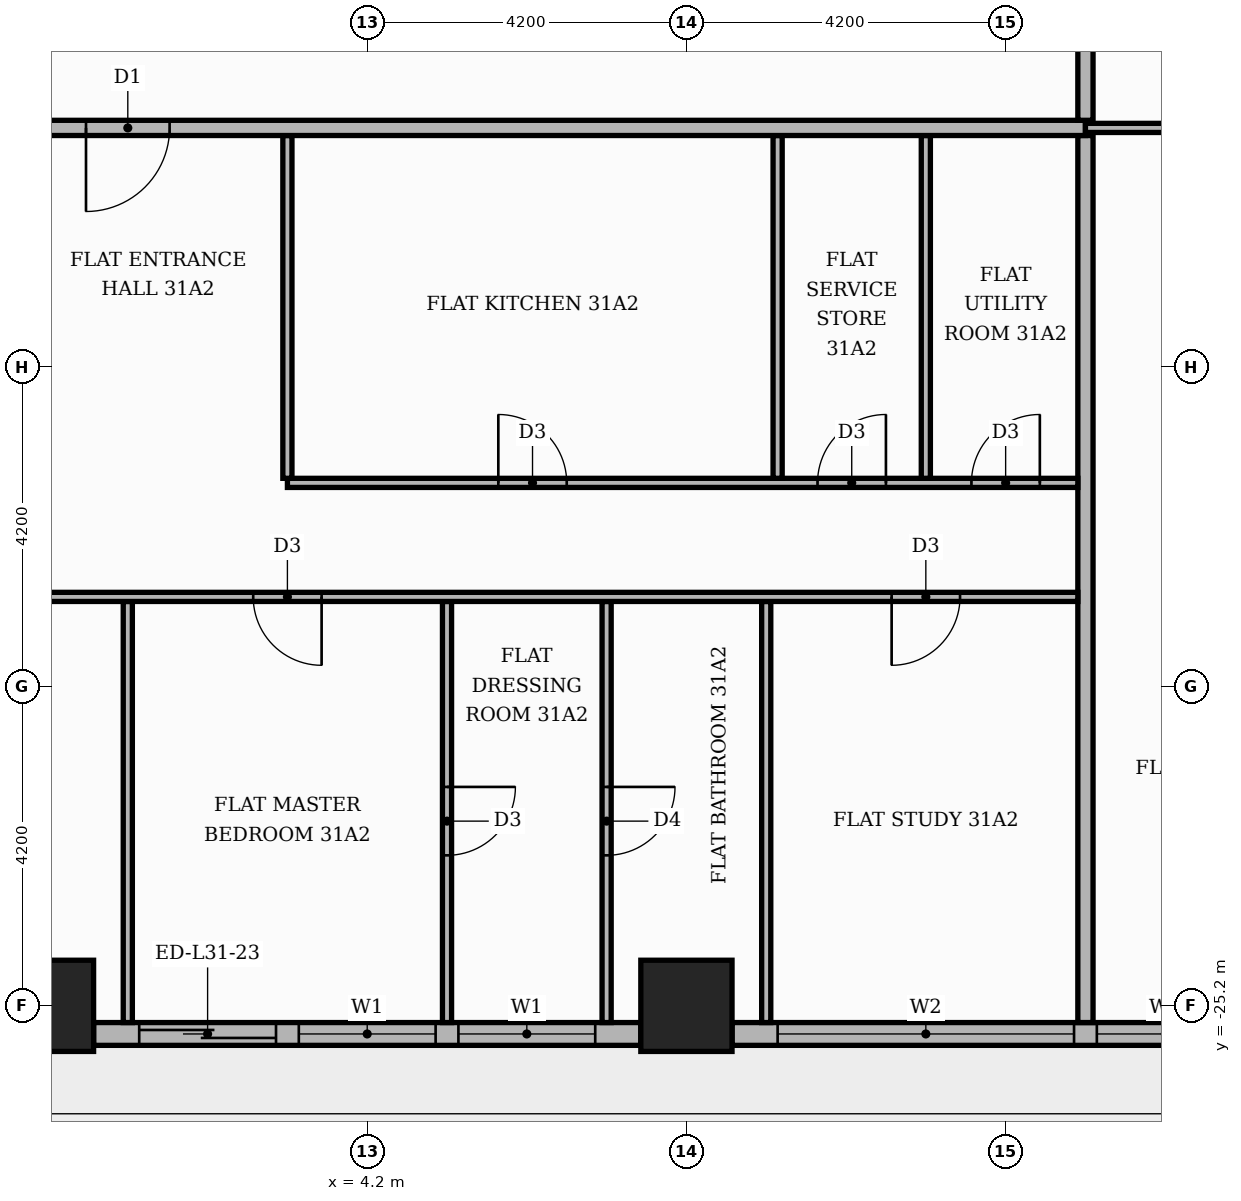
"""IFC4 building model, lengths in metres.
Left out: names, types, materials, properties, quantities, classifications, styles, units other than length and angle.
Written with IfcOpenShell. Run it as: python <this file> out.ifc"""

import sys

from ifc_helpers import new_model, si_unit, direction, frame, frame_2d, origin, origin_2d, place, context, subcontext, project, spatial, rectangle, extrude, element, fill, save


model = new_model("IFC4")
c1 = context("Model", 3, precision=1e-05, world=origin(), true_north=direction((0.0, 1.0)))
c2 = subcontext(c1, "Body", "Model", "MODEL_VIEW")
j1 = project(units=[si_unit("LENGTHUNIT", "METRE"), si_unit("PLANEANGLEUNIT", "RADIAN")], contexts=[c1])
p1 = place(None, origin())
s1 = spatial("IfcSite", under=j1, at=p1, CompositionType="ELEMENT")
p2 = place(p1, origin())
s2 = spatial("IfcBuilding", under=s1, at=p2, CompositionType="ELEMENT")
p3 = place(p2, frame((0.0, 0.0, 133.8)))
s3 = spatial("IfcBuildingStorey", under=s2, at=p3, CompositionType="ELEMENT", Elevation=133.8)
for number, where, z_axis, x_axis in (
    (1, (0.0, -25.2, 0.0), (0.0, 0.0, 1.0), (1.0, 0.0, 0.0)),
    (2, (8.4, -25.2, 0.0), (0.0, 0.0, 1.0), (1.0, 0.0, 0.0)),
):
    element("IfcColumn", number, at=place(p3, frame(where, z_axis=z_axis, x_axis=x_axis)), inside=s3, PredefinedType="COLUMN", context=c2, shape_type="SweptSolid", body=[
        extrude(rectangle(XDim=1.2, YDim=1.2, at=origin_2d()), origin(), (0.0, 0.0, 1.0), 3.9),
    ])
p4 = place(p3, frame((0.6, -25.57, 0.0), z_axis=(0.0, 0.0, 1.0), x_axis=(1.0, 0.0, 0.0)))
e3 = element("IfcWall", 3, at=p4, inside=s3, PredefinedType="STANDARD", context=c2, shape_type="SweptSolid", body=[
    extrude(rectangle(XDim=7.2, YDim=0.3, at=frame_2d((3.6, 0.0))), origin(), (0.0, 0.0, 1.0), 3.48),
])
p5 = place(p4, frame((0.6, 0.0, 0.0)))
e4 = element("IfcOpeningElement", 4, at=p5, cuts=e3, PredefinedType="OPENING", context=c2, shape_type="SweptSolid", body=[
    extrude(rectangle(XDim=1.8, YDim=2.4, at=frame_2d((0.9, 1.2))), frame((0.0, 0.16, 0.0), z_axis=(0.0, -1.0, 0.0), x_axis=(1.0, 0.0, 0.0)), (0.0, 0.0, 1.0), 0.32),
])
p6 = place(p4, frame((2.7, 0.0, 0.9)))
e5 = element("IfcOpeningElement", 5, at=p6, cuts=e3, PredefinedType="OPENING", context=c2, shape_type="SweptSolid", body=[
    extrude(rectangle(XDim=1.8, YDim=2.1, at=frame_2d((0.9, 1.05))), frame((0.0, 0.16, 0.0), z_axis=(0.0, -1.0, 0.0), x_axis=(1.0, 0.0, 0.0)), (0.0, 0.0, 1.0), 0.32),
])
p7 = place(p4, frame((4.8, 0.0, 0.9)))
e6 = element("IfcOpeningElement", 6, at=p7, cuts=e3, PredefinedType="OPENING", context=c2, shape_type="SweptSolid", body=[
    extrude(rectangle(XDim=1.8, YDim=2.1, at=frame_2d((0.9, 1.05))), frame((0.0, 0.16, 0.0), z_axis=(0.0, -1.0, 0.0), x_axis=(1.0, 0.0, 0.0)), (0.0, 0.0, 1.0), 0.32),
])
p8 = place(p3, frame((9.0, -25.57, 0.0), z_axis=(0.0, 0.0, 1.0), x_axis=(1.0, 0.0, 0.0)))
e7 = element("IfcWall", 7, at=p8, inside=s3, PredefinedType="STANDARD", context=c2, shape_type="SweptSolid", body=[
    extrude(rectangle(XDim=7.2, YDim=0.3, at=frame_2d((3.6, 0.0))), origin(), (0.0, 0.0, 1.0), 3.48),
])
p9 = place(p8, frame((0.6, 0.0, 0.9)))
e8 = element("IfcOpeningElement", 8, at=p9, cuts=e7, PredefinedType="OPENING", context=c2, shape_type="SweptSolid", body=[
    extrude(rectangle(XDim=3.9, YDim=2.1, at=frame_2d((1.95, 1.05))), frame((0.0, 0.16, 0.0), z_axis=(0.0, -1.0, 0.0), x_axis=(1.0, 0.0, 0.0)), (0.0, 0.0, 1.0), 0.32),
])
p10 = place(p8, frame((4.8, 0.0, 0.9)))
e9 = element("IfcOpeningElement", 9, at=p10, cuts=e7, PredefinedType="OPENING", context=c2, shape_type="SweptSolid", body=[
    extrude(rectangle(XDim=1.8, YDim=2.1, at=frame_2d((0.9, 1.05))), frame((0.0, 0.16, 0.0), z_axis=(0.0, -1.0, 0.0), x_axis=(1.0, 0.0, 0.0)), (0.0, 0.0, 1.0), 0.32),
])
p11 = place(p3, frame((1.05, -25.42, 0.0), z_axis=(0.0, 0.0, 1.0), x_axis=(0.0, 1.0, 0.0)))
e10 = element("IfcWall", 10, at=p11, inside=s3, PredefinedType="PARTITIONING", context=c2, shape_type="SweptSolid", body=[
    extrude(rectangle(XDim=5.54, YDim=0.12, at=frame_2d((2.77, 0.0))), origin(), (0.0, 0.0, 1.0), 3.48),
])
p12 = place(p3, frame((5.25, -25.42, 0.0), z_axis=(0.0, 0.0, 1.0), x_axis=(0.0, 1.0, 0.0)))
e11 = element("IfcWall", 11, at=p12, inside=s3, PredefinedType="PARTITIONING", context=c2, shape_type="SweptSolid", body=[
    extrude(rectangle(XDim=5.54, YDim=0.12, at=frame_2d((2.77, 0.0))), origin(), (0.0, 0.0, 1.0), 3.48),
])
p13 = place(p12, frame((2.2, 0.0, 0.0)))
e12 = element("IfcOpeningElement", 12, at=p13, cuts=e11, PredefinedType="OPENING", context=c2, shape_type="SweptSolid", body=[
    extrude(rectangle(XDim=0.9, YDim=2.1, at=frame_2d((0.45, 1.05))), frame((0.0, 0.07, 0.0), z_axis=(0.0, -1.0, 0.0), x_axis=(1.0, 0.0, 0.0)), (0.0, 0.0, 1.0), 0.14),
])
p14 = place(p3, frame((7.35, -25.42, 0.0), z_axis=(0.0, 0.0, 1.0), x_axis=(0.0, 1.0, 0.0)))
e13 = element("IfcWall", 13, at=p14, inside=s3, PredefinedType="PARTITIONING", context=c2, shape_type="SweptSolid", body=[
    extrude(rectangle(XDim=5.54, YDim=0.12, at=frame_2d((2.77, 0.0))), origin(), (0.0, 0.0, 1.0), 3.48),
])
p15 = place(p14, frame((2.2, 0.0, 0.0)))
e14 = element("IfcOpeningElement", 14, at=p15, cuts=e13, PredefinedType="OPENING", context=c2, shape_type="SweptSolid", body=[
    extrude(rectangle(XDim=0.9, YDim=2.1, at=frame_2d((0.45, 1.05))), frame((0.0, 0.07, 0.0), z_axis=(0.0, -1.0, 0.0), x_axis=(1.0, 0.0, 0.0)), (0.0, 0.0, 1.0), 0.14),
])
p16 = place(p3, frame((9.45, -25.42, 0.0), z_axis=(0.0, 0.0, 1.0), x_axis=(0.0, 1.0, 0.0)))
e15 = element("IfcWall", 15, at=p16, inside=s3, PredefinedType="PARTITIONING", context=c2, shape_type="SweptSolid", body=[
    extrude(rectangle(XDim=5.54, YDim=0.12, at=frame_2d((2.77, 0.0))), origin(), (0.0, 0.0, 1.0), 3.48),
])
p17 = place(p3, frame((13.65, -25.42, 0.0), z_axis=(0.0, 0.0, 1.0), x_axis=(0.0, 1.0, 0.0)))
e16 = element("IfcWall", 16, at=p17, inside=s3, PredefinedType="PARTITIONING", context=c2, shape_type="SweptSolid", body=[
    extrude(rectangle(XDim=11.67, YDim=0.2, at=frame_2d((5.835, 0.0))), origin(), (0.0, 0.0, 1.0), 3.48),
])
p18 = place(p3, frame((-5.15, -19.82, 0.0), z_axis=(0.0, 0.0, 1.0), x_axis=(1.0, 0.0, 0.0)))
e17 = element("IfcWall", 17, at=p18, inside=s3, PredefinedType="PARTITIONING", context=c2, shape_type="SweptSolid", body=[
    extrude(rectangle(XDim=18.7, YDim=0.12, at=frame_2d((9.35, 0.0))), origin(), (0.0, 0.0, 1.0), 3.48),
])
p19 = place(p18, frame((2.55, 0.0, 0.0)))
e18 = element("IfcOpeningElement", 18, at=p19, cuts=e17, PredefinedType="OPENING", context=c2, shape_type="SweptSolid", body=[
    extrude(rectangle(XDim=1.0, YDim=2.1, at=frame_2d((0.5, 1.05))), frame((0.0, 0.07, 0.0), z_axis=(0.0, -1.0, 0.0), x_axis=(1.0, 0.0, 0.0)), (0.0, 0.0, 1.0), 0.14),
])
p20 = place(p18, frame((7.85, 0.0, 0.0)))
e19 = element("IfcOpeningElement", 19, at=p20, cuts=e17, PredefinedType="OPENING", context=c2, shape_type="SweptSolid", body=[
    extrude(rectangle(XDim=0.9, YDim=2.1, at=frame_2d((0.45, 1.05))), frame((0.0, 0.07, 0.0), z_axis=(0.0, -1.0, 0.0), x_axis=(1.0, 0.0, 0.0)), (0.0, 0.0, 1.0), 0.14),
])
p21 = place(p18, frame((16.25, 0.0, 0.0)))
e20 = element("IfcOpeningElement", 20, at=p21, cuts=e17, PredefinedType="OPENING", context=c2, shape_type="SweptSolid", body=[
    extrude(rectangle(XDim=0.9, YDim=2.1, at=frame_2d((0.45, 1.05))), frame((0.0, 0.07, 0.0), z_axis=(0.0, -1.0, 0.0), x_axis=(1.0, 0.0, 0.0)), (0.0, 0.0, 1.0), 0.14),
])
p22 = place(p3, frame((3.15, -18.32, 0.0), z_axis=(0.0, 0.0, 1.0), x_axis=(1.0, 0.0, 0.0)))
e21 = element("IfcWall", 21, at=p22, inside=s3, PredefinedType="PARTITIONING", context=c2, shape_type="SweptSolid", body=[
    extrude(rectangle(XDim=10.4, YDim=0.12, at=frame_2d((5.2, 0.0))), origin(), (0.0, 0.0, 1.0), 3.48),
])
p23 = place(p22, frame((2.775, 0.0, 0.0)))
e22 = element("IfcOpeningElement", 22, at=p23, cuts=e21, PredefinedType="OPENING", context=c2, shape_type="SweptSolid", body=[
    extrude(rectangle(XDim=0.9, YDim=2.1, at=frame_2d((0.45, 1.05))), frame((0.0, 0.07, 0.0), z_axis=(0.0, -1.0, 0.0), x_axis=(1.0, 0.0, 0.0)), (0.0, 0.0, 1.0), 0.14),
])
p24 = place(p22, frame((6.975, 0.0, 0.0)))
e23 = element("IfcOpeningElement", 23, at=p24, cuts=e21, PredefinedType="OPENING", context=c2, shape_type="SweptSolid", body=[
    extrude(rectangle(XDim=0.9, YDim=2.1, at=frame_2d((0.45, 1.05))), frame((0.0, 0.07, 0.0), z_axis=(0.0, -1.0, 0.0), x_axis=(1.0, 0.0, 0.0)), (0.0, 0.0, 1.0), 0.14),
])
p25 = place(p22, frame((9.0, 0.0, 0.0)))
e24 = element("IfcOpeningElement", 24, at=p25, cuts=e21, PredefinedType="OPENING", context=c2, shape_type="SweptSolid", body=[
    extrude(rectangle(XDim=0.9, YDim=2.1, at=frame_2d((0.45, 1.05))), frame((0.0, 0.07, 0.0), z_axis=(0.0, -1.0, 0.0), x_axis=(1.0, 0.0, 0.0)), (0.0, 0.0, 1.0), 0.14),
])
for number, where, z_axis, x_axis in (
    (25, (3.15, -18.26, 0.0), (0.0, 0.0, 1.0), (0.0, 1.0, 0.0)),
    (26, (9.6, -18.26, 0.0), (0.0, 0.0, 1.0), (0.0, 1.0, 0.0)),
    (27, (11.55, -18.26, 0.0), (0.0, 0.0, 1.0), (0.0, 1.0, 0.0)),
):
    element("IfcWall", number, at=place(p3, frame(where, z_axis=z_axis, x_axis=x_axis)), inside=s3, PredefinedType="PARTITIONING", context=c2, shape_type="SweptSolid", body=[
        extrude(rectangle(XDim=4.51, YDim=0.12, at=frame_2d((2.255, 0.0))), origin(), (0.0, 0.0, 1.0), 3.48),
    ])
p26 = place(p3, frame((-25.42, -13.65, 0.0), z_axis=(0.0, 0.0, 1.0), x_axis=(1.0, 0.0, 0.0)))
e28 = element("IfcWall", 28, at=p26, inside=s3, PredefinedType="PARTITIONING", context=c2, shape_type="SweptSolid", body=[
    extrude(rectangle(XDim=39.07, YDim=0.2, at=frame_2d((19.535, 0.0))), origin(), (0.0, 0.0, 1.0), 3.48),
])
p27 = place(p26, frame((13.32, 0.0, 0.0)))
e29 = element("IfcOpeningElement", 29, at=p27, cuts=e28, PredefinedType="OPENING", context=c2, shape_type="SweptSolid", body=[
    extrude(rectangle(XDim=1.1, YDim=2.4, at=frame_2d((0.55, 1.2))), frame((0.0, 0.11, 0.0), z_axis=(0.0, -1.0, 0.0), x_axis=(1.0, 0.0, 0.0)), (0.0, 0.0, 1.0), 0.22),
])
p28 = place(p26, frame((25.92, 0.0, 0.0)))
e30 = element("IfcOpeningElement", 30, at=p28, cuts=e28, PredefinedType="OPENING", context=c2, shape_type="SweptSolid", body=[
    extrude(rectangle(XDim=1.1, YDim=2.4, at=frame_2d((0.55, 1.2))), frame((0.0, 0.11, 0.0), z_axis=(0.0, -1.0, 0.0), x_axis=(1.0, 0.0, 0.0)), (0.0, 0.0, 1.0), 0.22),
])
p29 = place(p3, frame((13.65, -13.65, 0.0), z_axis=(0.0, 0.0, 1.0), x_axis=(1.0, 0.0, 0.0)))
e31 = element("IfcWall", 31, at=p29, inside=s3, PredefinedType="PARTITIONING", context=c2, shape_type="SweptSolid", body=[
    extrude(rectangle(XDim=6.77, YDim=0.12, at=frame_2d((3.385, 0.0))), origin(), (0.0, 0.0, 1.0), 3.48),
])
p30 = place(p29, frame((2.935, 0.0, 0.0)))
e32 = element("IfcOpeningElement", 32, at=p30, cuts=e31, PredefinedType="OPENING", context=c2, shape_type="SweptSolid", body=[
    extrude(rectangle(XDim=0.9, YDim=2.1, at=frame_2d((0.45, 1.05))), frame((0.0, 0.07, 0.0), z_axis=(0.0, -1.0, 0.0), x_axis=(1.0, 0.0, 0.0)), (0.0, 0.0, 1.0), 0.14),
])
p31 = place(p3, frame((13.65, -13.55, 0.0), z_axis=(0.0, 0.0, 1.0), x_axis=(0.0, 1.0, 0.0)))
e33 = element("IfcWall", 33, at=p31, inside=s3, PredefinedType="PARTITIONING", context=c2, shape_type="SweptSolid", body=[
    extrude(rectangle(XDim=2.45, YDim=0.2, at=frame_2d((1.225, 0.0))), origin(), (0.0, 0.0, 1.0), 3.48),
])
p32 = place(p5, origin())
e34 = element("IfcDoor", 34, at=p32, inside=s3, OperationType="SLIDING_TO_LEFT", PredefinedType="DOOR", context=c2, shape_type="SweptSolid", body=[
    extrude(rectangle(XDim=1.8, YDim=2.4, at=frame_2d((0.9, 1.2))), frame((0.0, 0.025, 0.0), z_axis=(0.0, -1.0, 0.0), x_axis=(1.0, 0.0, 0.0)), (0.0, 0.0, 1.0), 0.05),
])
fill(e4, e34)
p33 = place(p6, origin())
e35 = element("IfcWindow", 35, at=p33, inside=s3, PartitioningType="SINGLE_PANEL", PredefinedType="WINDOW", context=c2, shape_type="SweptSolid", body=[
    extrude(rectangle(XDim=1.8, YDim=2.1, at=frame_2d((0.9, 1.05))), frame((0.0, 0.03, 0.0), z_axis=(0.0, -1.0, 0.0), x_axis=(1.0, 0.0, 0.0)), (0.0, 0.0, 1.0), 0.06),
])
fill(e5, e35)
p34 = place(p7, origin())
e36 = element("IfcWindow", 36, at=p34, inside=s3, PartitioningType="SINGLE_PANEL", PredefinedType="WINDOW", context=c2, shape_type="SweptSolid", body=[
    extrude(rectangle(XDim=1.8, YDim=2.1, at=frame_2d((0.9, 1.05))), frame((0.0, 0.03, 0.0), z_axis=(0.0, -1.0, 0.0), x_axis=(1.0, 0.0, 0.0)), (0.0, 0.0, 1.0), 0.06),
])
fill(e6, e36)
p35 = place(p9, origin())
e37 = element("IfcWindow", 37, at=p35, inside=s3, PartitioningType="SINGLE_PANEL", PredefinedType="WINDOW", context=c2, shape_type="SweptSolid", body=[
    extrude(rectangle(XDim=3.9, YDim=2.1, at=frame_2d((1.95, 1.05))), frame((0.0, 0.03, 0.0), z_axis=(0.0, -1.0, 0.0), x_axis=(1.0, 0.0, 0.0)), (0.0, 0.0, 1.0), 0.06),
])
fill(e8, e37)
p36 = place(p10, origin())
e38 = element("IfcWindow", 38, at=p36, inside=s3, PartitioningType="SINGLE_PANEL", PredefinedType="WINDOW", context=c2, shape_type="SweptSolid", body=[
    extrude(rectangle(XDim=1.8, YDim=2.1, at=frame_2d((0.9, 1.05))), frame((0.0, 0.03, 0.0), z_axis=(0.0, -1.0, 0.0), x_axis=(1.0, 0.0, 0.0)), (0.0, 0.0, 1.0), 0.06),
])
fill(e9, e38)
p37 = place(p28, frame((1.1, 0.0, 0.0), z_axis=(0.0, 0.0, 1.0), x_axis=(-1.0, 0.0, 0.0)))
e39 = element("IfcDoor", 39, at=p37, inside=s3, OperationType="SINGLE_SWING_LEFT", PredefinedType="DOOR", context=c2, shape_type="SweptSolid", body=[
    extrude(rectangle(XDim=1.1, YDim=2.4, at=frame_2d((0.55, 1.2))), frame((0.0, 0.025, 0.0), z_axis=(0.0, -1.0, 0.0), x_axis=(1.0, 0.0, 0.0)), (0.0, 0.0, 1.0), 0.05),
])
fill(e30, e39)
p38 = place(p23, origin())
e40 = element("IfcDoor", 40, at=p38, inside=s3, OperationType="SINGLE_SWING_LEFT", PredefinedType="DOOR", context=c2, shape_type="SweptSolid", body=[
    extrude(rectangle(XDim=0.9, YDim=2.1, at=frame_2d((0.45, 1.05))), frame((0.0, 0.025, 0.0), z_axis=(0.0, -1.0, 0.0), x_axis=(1.0, 0.0, 0.0)), (0.0, 0.0, 1.0), 0.05),
])
fill(e22, e40)
p39 = place(p24, origin())
e41 = element("IfcDoor", 41, at=p39, inside=s3, OperationType="SINGLE_SWING_RIGHT", PredefinedType="DOOR", context=c2, shape_type="SweptSolid", body=[
    extrude(rectangle(XDim=0.9, YDim=2.1, at=frame_2d((0.45, 1.05))), frame((0.0, 0.025, 0.0), z_axis=(0.0, -1.0, 0.0), x_axis=(1.0, 0.0, 0.0)), (0.0, 0.0, 1.0), 0.05),
])
fill(e23, e41)
p40 = place(p25, origin())
e42 = element("IfcDoor", 42, at=p40, inside=s3, OperationType="SINGLE_SWING_RIGHT", PredefinedType="DOOR", context=c2, shape_type="SweptSolid", body=[
    extrude(rectangle(XDim=0.9, YDim=2.1, at=frame_2d((0.45, 1.05))), frame((0.0, 0.025, 0.0), z_axis=(0.0, -1.0, 0.0), x_axis=(1.0, 0.0, 0.0)), (0.0, 0.0, 1.0), 0.05),
])
fill(e24, e42)
p41 = place(p20, frame((0.9, 0.0, 0.0), z_axis=(0.0, 0.0, 1.0), x_axis=(-1.0, 0.0, 0.0)))
e43 = element("IfcDoor", 43, at=p41, inside=s3, OperationType="SINGLE_SWING_RIGHT", PredefinedType="DOOR", context=c2, shape_type="SweptSolid", body=[
    extrude(rectangle(XDim=0.9, YDim=2.1, at=frame_2d((0.45, 1.05))), frame((0.0, 0.025, 0.0), z_axis=(0.0, -1.0, 0.0), x_axis=(1.0, 0.0, 0.0)), (0.0, 0.0, 1.0), 0.05),
])
fill(e19, e43)
p42 = place(p13, frame((0.9, 0.0, 0.0), z_axis=(0.0, 0.0, 1.0), x_axis=(-1.0, 0.0, 0.0)))
e44 = element("IfcDoor", 44, at=p42, inside=s3, OperationType="SINGLE_SWING_RIGHT", PredefinedType="DOOR", context=c2, shape_type="SweptSolid", body=[
    extrude(rectangle(XDim=0.9, YDim=2.1, at=frame_2d((0.45, 1.05))), frame((0.0, 0.025, 0.0), z_axis=(0.0, -1.0, 0.0), x_axis=(1.0, 0.0, 0.0)), (0.0, 0.0, 1.0), 0.05),
])
fill(e12, e44)
p43 = place(p15, frame((0.9, 0.0, 0.0), z_axis=(0.0, 0.0, 1.0), x_axis=(-1.0, 0.0, 0.0)))
e45 = element("IfcDoor", 45, at=p43, inside=s3, OperationType="SINGLE_SWING_RIGHT", PredefinedType="DOOR", context=c2, shape_type="SweptSolid", body=[
    extrude(rectangle(XDim=0.9, YDim=2.1, at=frame_2d((0.45, 1.05))), frame((0.0, 0.025, 0.0), z_axis=(0.0, -1.0, 0.0), x_axis=(1.0, 0.0, 0.0)), (0.0, 0.0, 1.0), 0.05),
])
fill(e14, e45)
p44 = place(p21, frame((0.9, 0.0, 0.0), z_axis=(0.0, 0.0, 1.0), x_axis=(-1.0, 0.0, 0.0)))
e46 = element("IfcDoor", 46, at=p44, inside=s3, OperationType="SINGLE_SWING_LEFT", PredefinedType="DOOR", context=c2, shape_type="SweptSolid", body=[
    extrude(rectangle(XDim=0.9, YDim=2.1, at=frame_2d((0.45, 1.05))), frame((0.0, 0.025, 0.0), z_axis=(0.0, -1.0, 0.0), x_axis=(1.0, 0.0, 0.0)), (0.0, 0.0, 1.0), 0.05),
])
fill(e20, e46)
save(model, sys.argv[1])
